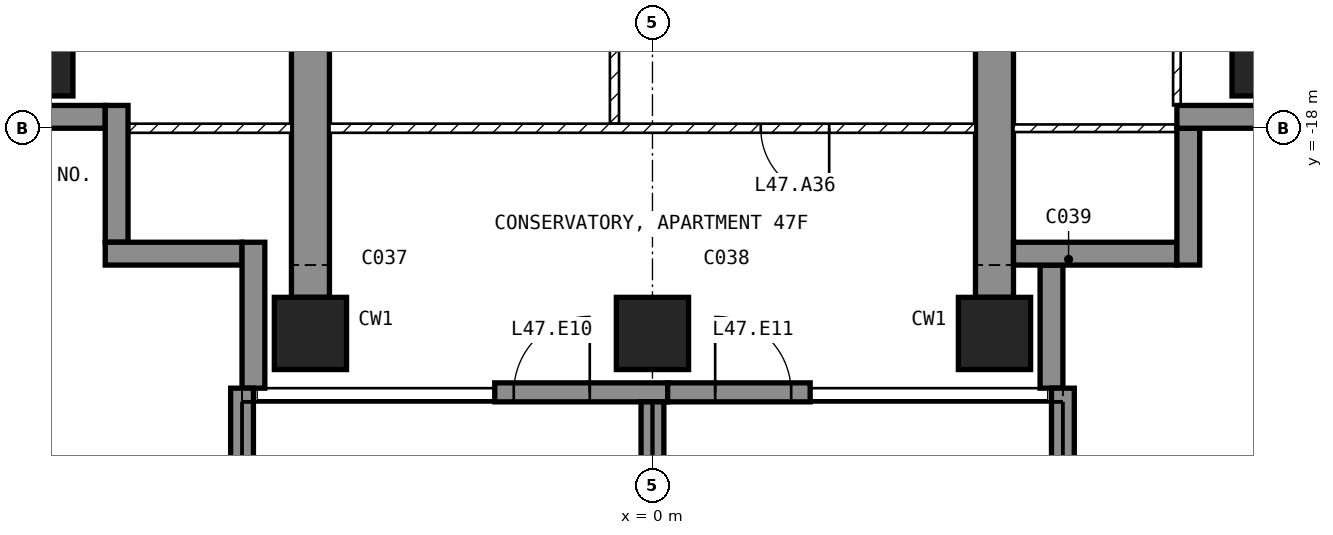
"""IFC4 building model, lengths in metres.
Left out: names, types, materials, properties, quantities, classifications, styles, units other than length and angle.
Written with IfcOpenShell. Run it as: python <this file> out.ifc"""

import sys

from ifc_helpers import new_model, si_unit, direction, frame, frame_2d, origin, origin_2d, place, context, subcontext, project, spatial, polyline, rectangle, outline, extrude, element, fill, save


model = new_model("IFC4")
c1 = context("Model", 3, precision=1e-05, world=origin(), true_north=direction((0.0, 1.0)))
c2 = subcontext(c1, "Body", "Model", "MODEL_VIEW")
j1 = project(units=[si_unit("LENGTHUNIT", "METRE"), si_unit("PLANEANGLEUNIT", "RADIAN")], contexts=[c1])
p1 = place(None, origin())
s1 = spatial("IfcSite", under=j1, at=p1, CompositionType="ELEMENT")
p2 = place(p1, origin())
s2 = spatial("IfcBuilding", under=s1, at=p2, CompositionType="ELEMENT")
p3 = place(p2, frame((0.0, 0.0, 191.1)))
s3 = spatial("IfcBuildingStorey", under=s2, at=p3, CompositionType="ELEMENT", Elevation=191.1)
for number, where, z_axis, x_axis in (
    (1, (-8.1, -17.1, -0.25), (0.0, 0.0, 1.0), (1.0, 0.0, 0.0)),
    (2, (-4.5, -20.7, -0.25), (0.0, 0.0, 1.0), (1.0, 0.0, 0.0)),
    (3, (0.0, -20.7, -0.25), (0.0, 0.0, 1.0), (1.0, 0.0, 0.0)),
    (4, (4.5, -20.7, -0.25), (0.0, 0.0, 1.0), (1.0, 0.0, 0.0)),
    (5, (8.1, -17.1, -0.25), (0.0, 0.0, 1.0), (1.0, 0.0, 0.0)),
):
    element("IfcColumn", number, at=place(p3, frame(where, z_axis=z_axis, x_axis=x_axis)), inside=s3, PredefinedType="COLUMN", context=c2, shape_type="SweptSolid", body=[
        extrude(rectangle(XDim=0.95, YDim=0.95, at=origin_2d()), origin(), (0.0, 0.0, 1.0), 3.5),
    ])
for number, where, z_axis, x_axis in (
    (6, (-4.75, -20.225, -0.25), (1.0, 0.0, 0.0), (0.0, 1.0, 0.0)),
    (7, (4.25, -20.225, -0.25), (1.0, 0.0, 0.0), (0.0, 1.0, 0.0)),
):
    element("IfcWall", number, at=place(p3, frame(where, z_axis=z_axis, x_axis=x_axis)), inside=s3, PredefinedType="SHEAR", context=c2, shape_type="SweptSolid", body=[
        extrude(outline(polyline([(0.0, 0.0), (6.725, 0.0), (6.725, 2.65), (9.125, 2.65), (9.125, 0.0), (11.225, 0.0), (11.225, 3.5), (0.0, 3.5), (0.0, 0.0)])), origin(), (0.0, 0.0, 1.0), 0.5),
    ])
p4 = place(p3, frame((-2.075, -21.475, 0.0), z_axis=(0.0, 0.0, 1.0), x_axis=(1.0, 0.0, 0.0)))
e8 = element("IfcWall", 8, at=p4, inside=s3, PredefinedType="SOLIDWALL", context=c2, shape_type="SweptSolid", body=[
    extrude(rectangle(XDim=2.275, YDim=0.25, at=frame_2d((1.137, 0.0))), origin(), (0.0, 0.0, 1.0), 3.25),
])
p5 = place(p4, frame((0.25, 0.0, 0.0)))
e9 = element("IfcOpeningElement", 9, at=p5, cuts=e8, PredefinedType="OPENING", context=c2, shape_type="SweptSolid", body=[
    extrude(rectangle(XDim=1.0, YDim=2.4, at=frame_2d((0.5, 1.2))), frame((0.0, 0.135, 0.0), z_axis=(0.0, -1.0, 0.0), x_axis=(1.0, 0.0, 0.0)), (0.0, 0.0, 1.0), 0.27),
])
p6 = place(p3, frame((0.2, -21.475, 0.0), z_axis=(0.0, 0.0, 1.0), x_axis=(1.0, 0.0, 0.0)))
e10 = element("IfcWall", 10, at=p6, inside=s3, PredefinedType="SOLIDWALL", context=c2, shape_type="SweptSolid", body=[
    extrude(rectangle(XDim=1.875, YDim=0.25, at=frame_2d((0.938, 0.0))), origin(), (0.0, 0.0, 1.0), 3.25),
])
p7 = place(p6, frame((0.625, 0.0, 0.0)))
e11 = element("IfcOpeningElement", 11, at=p7, cuts=e10, PredefinedType="OPENING", context=c2, shape_type="SweptSolid", body=[
    extrude(rectangle(XDim=1.0, YDim=2.4, at=frame_2d((0.5, 1.2))), frame((0.0, 0.135, 0.0), z_axis=(0.0, -1.0, 0.0), x_axis=(1.0, 0.0, 0.0)), (0.0, 0.0, 1.0), 0.27),
])
p8 = place(p3, frame((5.25, -21.42, 0.0), z_axis=(0.0, 0.0, 1.0), x_axis=(0.0, 1.0, 0.0)))
e12 = element("IfcWall", 12, at=p8, inside=s3, PredefinedType="SOLIDWALL", context=c2, shape_type="SweptSolid", body=[
    extrude(rectangle(XDim=1.62, YDim=0.3, at=frame_2d((0.81, 0.0))), origin(), (0.0, 0.0, 1.0), 3.25),
])
p9 = place(p3, frame((4.75, -19.65, 0.0), z_axis=(0.0, 0.0, 1.0), x_axis=(1.0, 0.0, 0.0)))
e13 = element("IfcWall", 13, at=p9, inside=s3, PredefinedType="SOLIDWALL", context=c2, shape_type="SweptSolid", body=[
    extrude(rectangle(XDim=2.15, YDim=0.3, at=frame_2d((1.075, 0.0))), origin(), (0.0, 0.0, 1.0), 3.25),
])
p10 = place(p3, frame((7.05, -19.8, 0.0), z_axis=(0.0, 0.0, 1.0), x_axis=(0.0, 1.0, 0.0)))
e14 = element("IfcWall", 14, at=p10, inside=s3, PredefinedType="SOLIDWALL", context=c2, shape_type="SweptSolid", body=[
    extrude(rectangle(XDim=1.8, YDim=0.3, at=frame_2d((0.9, 0.0))), origin(), (0.0, 0.0, 1.0), 3.25),
])
p11 = place(p3, frame((6.9, -17.85, 0.0), z_axis=(0.0, 0.0, 1.0), x_axis=(1.0, 0.0, 0.0)))
e15 = element("IfcWall", 15, at=p11, inside=s3, PredefinedType="SOLIDWALL", context=c2, shape_type="SweptSolid", body=[
    extrude(rectangle(XDim=1.85, YDim=0.3, at=frame_2d((0.925, 0.0))), origin(), (0.0, 0.0, 1.0), 3.25),
])
p12 = place(p3, frame((-8.75, -17.85, 0.0), z_axis=(0.0, 0.0, 1.0), x_axis=(1.0, 0.0, 0.0)))
e16 = element("IfcWall", 16, at=p12, inside=s3, PredefinedType="SOLIDWALL", context=c2, shape_type="SweptSolid", body=[
    extrude(rectangle(XDim=1.55, YDim=0.3, at=frame_2d((0.775, 0.0))), origin(), (0.0, 0.0, 1.0), 3.25),
])
for number, where, z_axis, x_axis in (
    (17, (-7.05, -17.7, 0.0), (0.0, 0.0, 1.0), (0.0, -1.0, 0.0)),
    (18, (-7.2, -19.65, 0.0), (0.0, 0.0, 1.0), (1.0, 0.0, 0.0)),
):
    element("IfcWall", number, at=place(p3, frame(where, z_axis=z_axis, x_axis=x_axis)), inside=s3, PredefinedType="SOLIDWALL", context=c2, shape_type="SweptSolid", body=[
        extrude(rectangle(XDim=1.8, YDim=0.3, at=frame_2d((0.9, 0.0))), origin(), (0.0, 0.0, 1.0), 3.25),
    ])
p13 = place(p3, frame((-5.25, -19.5, 0.0), z_axis=(0.0, 0.0, 1.0), x_axis=(0.0, -1.0, 0.0)))
e19 = element("IfcWall", 19, at=p13, inside=s3, PredefinedType="SOLIDWALL", context=c2, shape_type="SweptSolid", body=[
    extrude(rectangle(XDim=1.92, YDim=0.3, at=frame_2d((0.96, 0.0))), origin(), (0.0, 0.0, 1.0), 3.25),
])
p14 = place(p3, frame((-5.4, -21.42, 0.0), z_axis=(0.0, 0.0, 1.0), x_axis=(0.0, -1.0, 0.0)))
e20 = element("IfcWall", 20, at=p14, inside=s3, PredefinedType="SOLIDWALL", context=c2, shape_type="SweptSolid", body=[
    extrude(rectangle(XDim=2.88, YDim=0.3, at=frame_2d((1.44, 0.0))), origin(), (0.0, 0.0, 1.0), 3.25),
])
p15 = place(p3, frame((0.0, -21.6, 0.0), z_axis=(0.0, 0.0, 1.0), x_axis=(0.0, -1.0, 0.0)))
e21 = element("IfcWall", 21, at=p15, inside=s3, PredefinedType="SOLIDWALL", context=c2, shape_type="SweptSolid", body=[
    extrude(rectangle(XDim=2.7, YDim=0.3, at=frame_2d((1.35, 0.0))), origin(), (0.0, 0.0, 1.0), 3.25),
])
p16 = place(p3, frame((5.4, -21.42, 0.0), z_axis=(0.0, 0.0, 1.0), x_axis=(0.0, -1.0, 0.0)))
e22 = element("IfcWall", 22, at=p16, inside=s3, PredefinedType="SOLIDWALL", context=c2, shape_type="SweptSolid", body=[
    extrude(rectangle(XDim=2.88, YDim=0.3, at=frame_2d((1.44, 0.0))), origin(), (0.0, 0.0, 1.0), 3.25),
])
p17 = place(p3, frame((-0.5, -17.94, 0.0), z_axis=(0.0, 0.0, 1.0), x_axis=(0.0, 1.0, 0.0)))
e23 = element("IfcWall", 23, at=p17, inside=s3, PredefinedType="PARTITIONING", context=c2, shape_type="SweptSolid", body=[
    extrude(rectangle(XDim=2.88, YDim=0.12, at=frame_2d((1.44, 0.0))), origin(), (0.0, 0.0, 1.0), 3.25),
])
p18 = place(p17, frame((0.99, 0.0, 0.0)))
e24 = element("IfcOpeningElement", 24, at=p18, cuts=e23, PredefinedType="OPENING", context=c2, shape_type="SweptSolid", body=[
    extrude(rectangle(XDim=0.9, YDim=2.1, at=frame_2d((0.45, 1.05))), frame((0.0, 0.07, 0.0), z_axis=(0.0, -1.0, 0.0), x_axis=(1.0, 0.0, 0.0)), (0.0, 0.0, 1.0), 0.14),
])
p19 = place(p3, frame((4.25, -18.0, 0.0), z_axis=(0.0, 0.0, 1.0), x_axis=(-1.0, 0.0, 0.0)))
e25 = element("IfcWall", 25, at=p19, inside=s3, PredefinedType="PARTITIONING", context=c2, shape_type="SweptSolid", body=[
    extrude(rectangle(XDim=8.5, YDim=0.12, at=frame_2d((4.25, 0.0))), origin(), (0.0, 0.0, 1.0), 3.25),
])
p20 = place(p19, frame((1.925, 0.0, 0.0)))
e26 = element("IfcOpeningElement", 26, at=p20, cuts=e25, PredefinedType="OPENING", context=c2, shape_type="SweptSolid", body=[
    extrude(rectangle(XDim=0.9, YDim=2.1, at=frame_2d((0.45, 1.05))), frame((0.0, 0.07, 0.0), z_axis=(0.0, -1.0, 0.0), x_axis=(1.0, 0.0, 0.0)), (0.0, 0.0, 1.0), 0.14),
])
p21 = place(p3, frame((6.9, -17.7, 0.0), z_axis=(0.0, 0.0, 1.0), x_axis=(0.0, 1.0, 0.0)))
e27 = element("IfcWall", 27, at=p21, inside=s3, PredefinedType="PARTITIONING", context=c2, shape_type="SweptSolid", body=[
    extrude(rectangle(XDim=3.25, YDim=0.1, at=frame_2d((1.625, 0.0))), origin(), (0.0, 0.0, 1.0), 3.25),
])
p22 = place(p21, frame((2.05, 0.0, 0.0)))
e28 = element("IfcOpeningElement", 28, at=p22, cuts=e27, PredefinedType="OPENING", context=c2, shape_type="SweptSolid", body=[
    extrude(rectangle(XDim=0.85, YDim=2.1, at=frame_2d((0.425, 1.05))), frame((0.0, 0.06, 0.0), z_axis=(0.0, -1.0, 0.0), x_axis=(1.0, 0.0, 0.0)), (0.0, 0.0, 1.0), 0.12),
])
p23 = place(p3, frame((7.12, -18.0, 0.0), z_axis=(0.0, 0.0, 1.0), x_axis=(-1.0, 0.0, 0.0)))
e29 = element("IfcWall", 29, at=p23, inside=s3, PredefinedType="PARTITIONING", context=c2, shape_type="SweptSolid", body=[
    extrude(rectangle(XDim=2.37, YDim=0.1, at=frame_2d((1.185, 0.0))), origin(), (0.0, 0.0, 1.0), 3.25),
])
p24 = place(p3, frame((-4.75, -18.0, 0.0), z_axis=(0.0, 0.0, 1.0), x_axis=(-1.0, 0.0, 0.0)))
e30 = element("IfcWall", 30, at=p24, inside=s3, PredefinedType="PARTITIONING", context=c2, shape_type="SweptSolid", body=[
    extrude(rectangle(XDim=2.37, YDim=0.12, at=frame_2d((1.185, 0.0))), origin(), (0.0, 0.0, 1.0), 3.25),
])
p25 = place(p5, origin())
e31 = element("IfcDoor", 31, at=p25, inside=s3, OperationType="SINGLE_SWING_RIGHT", PredefinedType="DOOR", context=c2, shape_type="SweptSolid", body=[
    extrude(rectangle(XDim=1.0, YDim=2.4, at=frame_2d((0.5, 1.2))), frame((0.0, 0.025, 0.0), z_axis=(0.0, -1.0, 0.0), x_axis=(1.0, 0.0, 0.0)), (0.0, 0.0, 1.0), 0.05),
])
fill(e9, e31)
p26 = place(p7, origin())
e32 = element("IfcDoor", 32, at=p26, inside=s3, OperationType="SINGLE_SWING_LEFT", PredefinedType="DOOR", context=c2, shape_type="SweptSolid", body=[
    extrude(rectangle(XDim=1.0, YDim=2.4, at=frame_2d((0.5, 1.2))), frame((0.0, 0.025, 0.0), z_axis=(0.0, -1.0, 0.0), x_axis=(1.0, 0.0, 0.0)), (0.0, 0.0, 1.0), 0.05),
])
fill(e11, e32)
p27 = place(p20, origin())
e33 = element("IfcDoor", 33, at=p27, inside=s3, OperationType="SINGLE_SWING_LEFT", PredefinedType="DOOR", context=c2, shape_type="SweptSolid", body=[
    extrude(rectangle(XDim=0.9, YDim=2.1, at=frame_2d((0.45, 1.05))), frame((0.0, 0.025, 0.0), z_axis=(0.0, -1.0, 0.0), x_axis=(1.0, 0.0, 0.0)), (0.0, 0.0, 1.0), 0.05),
])
fill(e26, e33)
save(model, sys.argv[1])
